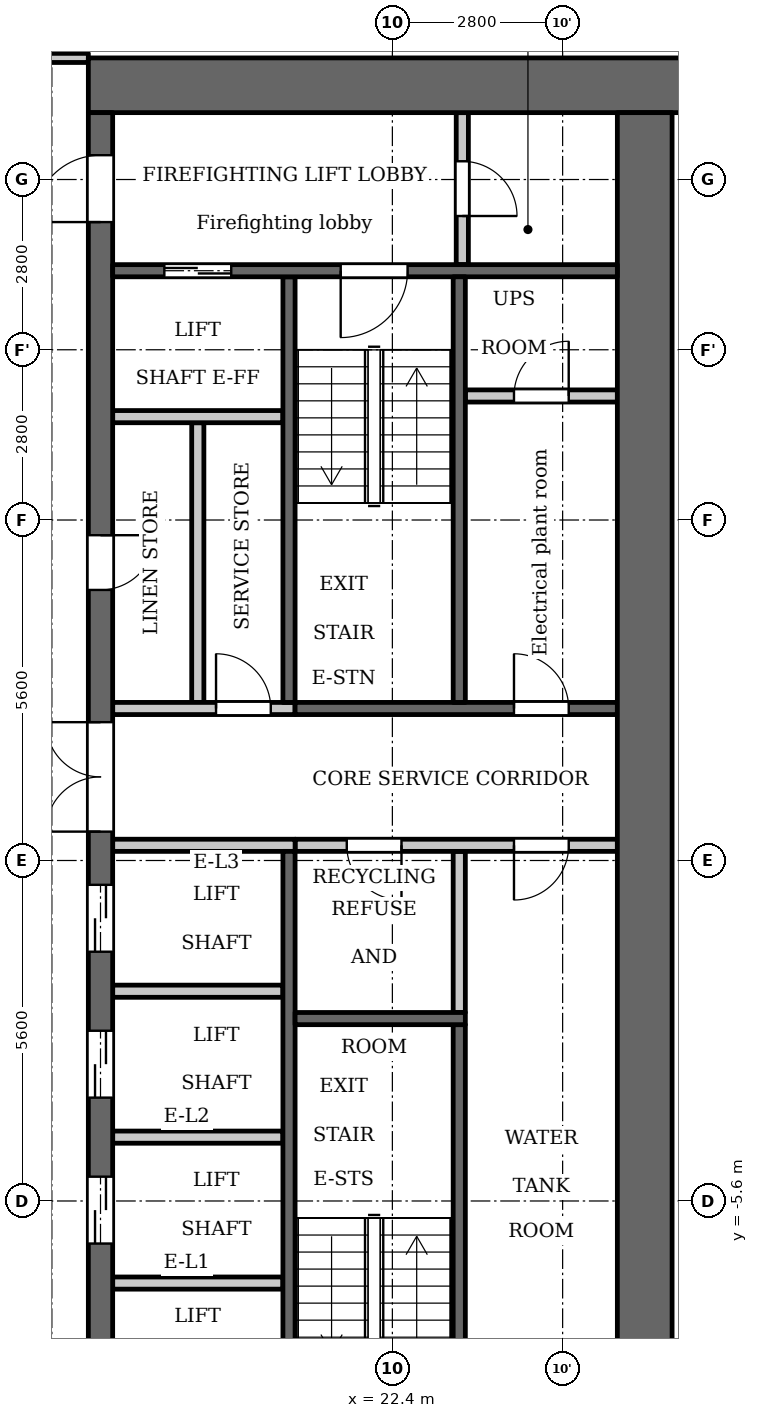
"""IFC4 building model, lengths in metres.
Left out: names, types, materials, properties, quantities, classifications, styles, units other than length and angle.
Written with IfcOpenShell. Run it as: python <this file> out.ifc"""

import sys

from ifc_helpers import new_model, si_unit, direction, frame, frame_2d, origin, place, context, subcontext, project, spatial, rectangle, extrude, element, fill, save


model = new_model("IFC4")
c1 = context("Model", 3, precision=1e-05, world=origin(), true_north=direction((0.0, 1.0)))
c2 = subcontext(c1, "Body", "Model", "MODEL_VIEW")
j1 = project(units=[si_unit("LENGTHUNIT", "METRE"), si_unit("PLANEANGLEUNIT", "RADIAN")], contexts=[c1])
p1 = place(None, origin())
s1 = spatial("IfcSite", under=j1, at=p1, CompositionType="ELEMENT")
p2 = place(p1, origin())
s2 = spatial("IfcBuilding", under=s1, at=p2, CompositionType="ELEMENT")
p3 = place(p2, frame((0.0, 0.0, 69.0)))
s3 = spatial("IfcBuildingStorey", under=s2, at=p3, CompositionType="ELEMENT", Elevation=69.0)
p4 = place(p3, frame((23.5, -2.5, 0.0), z_axis=(0.0, 0.0, 1.0), x_axis=(0.0, 1.0, 0.0)))
e1 = element("IfcWall", 1, at=p4, inside=s3, PredefinedType="PARTITIONING", context=c2, shape_type="SweptSolid", body=[
    extrude(rectangle(XDim=2.65, YDim=0.2, at=frame_2d((1.325, 0.0))), origin(), (0.0, 0.0, 1.0), 3.15),
])
p5 = place(p3, frame((20.7, 2.6, 0.0), z_axis=(0.0, 0.0, 1.0), x_axis=(0.0, 1.0, 0.0)))
e2 = element("IfcWall", 2, at=p5, inside=s3, PredefinedType="SHEAR", context=c2, shape_type="SweptSolid", body=[
    extrude(rectangle(XDim=7.0, YDim=0.2, at=frame_2d((3.5, 0.0))), origin(), (0.0, 0.0, 1.0), 3.15),
])
p6 = place(p3, frame((20.7, -9.6, 0.0), z_axis=(0.0, 0.0, 1.0), x_axis=(0.0, 1.0, 0.0)))
e3 = element("IfcWall", 3, at=p6, inside=s3, PredefinedType="SHEAR", context=c2, shape_type="SweptSolid", body=[
    extrude(rectangle(XDim=9.75, YDim=0.2, at=frame_2d((4.875, 0.0))), origin(), (0.0, 0.0, 1.0), 3.15),
])
p7 = place(p3, frame((20.8, 2.5, 0.0), z_axis=(0.0, 0.0, 1.0), x_axis=(1.0, 0.0, 0.0)))
e4 = element("IfcWall", 4, at=p7, inside=s3, PredefinedType="SHEAR", context=c2, shape_type="SweptSolid", body=[
    extrude(rectangle(XDim=5.3, YDim=0.2, at=frame_2d((2.65, 0.0))), origin(), (0.0, 0.0, 1.0), 3.15),
])
p8 = place(p7, frame((3.6, 0.0, 0.0)))
e5 = element("IfcOpeningElement", 5, at=p8, cuts=e4, PredefinedType="OPENING", context=c2, shape_type="SweptSolid", body=[
    extrude(rectangle(XDim=0.9, YDim=2.1, at=frame_2d((0.45, 1.05))), frame((0.0, 0.11, 0.0), z_axis=(0.0, -1.0, 0.0), x_axis=(1.0, 0.0, 0.0)), (0.0, 0.0, 1.0), 0.22),
])
p9 = place(p3, frame((20.8, 0.25, 0.0), z_axis=(0.0, 0.0, 1.0), x_axis=(1.0, 0.0, 0.0)))
e6 = element("IfcWall", 6, at=p9, inside=s3, PredefinedType="PARTITIONING", context=c2, shape_type="SweptSolid", body=[
    extrude(rectangle(XDim=5.3, YDim=0.2, at=frame_2d((2.65, 0.0))), origin(), (0.0, 0.0, 1.0), 3.15),
])
p10 = place(p9, frame((0.85, 0.0, 0.0)))
e7 = element("IfcOpeningElement", 7, at=p10, cuts=e6, PredefinedType="OPENING", context=c2, shape_type="SweptSolid", body=[
    extrude(rectangle(XDim=0.9, YDim=2.1, at=frame_2d((0.45, 1.05))), frame((0.0, 0.11, 0.0), z_axis=(0.0, -1.0, 0.0), x_axis=(1.0, 0.0, 0.0)), (0.0, 0.0, 1.0), 0.22),
])
p11 = place(p9, frame((3.6, 0.0, 0.0)))
e8 = element("IfcOpeningElement", 8, at=p11, cuts=e6, PredefinedType="OPENING", context=c2, shape_type="SweptSolid", body=[
    extrude(rectangle(XDim=0.9, YDim=2.1, at=frame_2d((0.45, 1.05))), frame((0.0, 0.11, 0.0), z_axis=(0.0, -1.0, 0.0), x_axis=(1.0, 0.0, 0.0)), (0.0, 0.0, 1.0), 0.22),
])
p12 = place(p3, frame((17.4, 12.75, 0.0), z_axis=(0.0, 0.0, 1.0), x_axis=(1.0, 0.0, 0.0)))
e9 = element("IfcWall", 9, at=p12, inside=s3, PredefinedType="SHEAR", context=c2, shape_type="SweptSolid", body=[
    extrude(rectangle(XDim=10.4, YDim=0.9, at=frame_2d((5.2, 0.0))), origin(), (0.0, 0.0, 1.0), 3.15),
])
p13 = place(p3, frame((19.2, 2.6, 0.0), z_axis=(0.0, 0.0, 1.0), x_axis=(0.0, 1.0, 0.0)))
e10 = element("IfcWall", 10, at=p13, inside=s3, PredefinedType="PARTITIONING", context=c2, shape_type="SweptSolid", body=[
    extrude(rectangle(XDim=4.6, YDim=0.2, at=frame_2d((2.3, 0.0))), origin(), (0.0, 0.0, 1.0), 3.15),
])
p14 = place(p3, frame((17.6, -12.3, 0.0), z_axis=(0.0, 0.0, 1.0), x_axis=(0.0, 1.0, 0.0)))
e11 = element("IfcWall", 11, at=p14, inside=s3, PredefinedType="SHEAR", context=c2, shape_type="SweptSolid", body=[
    extrude(rectangle(XDim=24.6, YDim=0.4, at=frame_2d((12.3, 0.0))), origin(), (0.0, 0.0, 1.0), 3.15),
])
p15 = place(p14, frame((6.0, 0.0, 0.0)))
e12 = element("IfcOpeningElement", 12, at=p15, cuts=e11, PredefinedType="OPENING", context=c2, shape_type="SweptSolid", body=[
    extrude(rectangle(XDim=1.1, YDim=2.1, at=frame_2d((0.55, 1.05))), frame((0.0, 0.21, 0.0), z_axis=(0.0, -1.0, 0.0), x_axis=(1.0, 0.0, 0.0)), (0.0, 0.0, 1.0), 0.42),
])
p16 = place(p14, frame((8.4, 0.0, 0.0)))
e13 = element("IfcOpeningElement", 13, at=p16, cuts=e11, PredefinedType="OPENING", context=c2, shape_type="SweptSolid", body=[
    extrude(rectangle(XDim=1.1, YDim=2.1, at=frame_2d((0.55, 1.05))), frame((0.0, 0.21, 0.0), z_axis=(0.0, -1.0, 0.0), x_axis=(1.0, 0.0, 0.0)), (0.0, 0.0, 1.0), 0.42),
])
p17 = place(p14, frame((10.8, 0.0, 0.0)))
e14 = element("IfcOpeningElement", 14, at=p17, cuts=e11, PredefinedType="OPENING", context=c2, shape_type="SweptSolid", body=[
    extrude(rectangle(XDim=1.1, YDim=2.1, at=frame_2d((0.55, 1.05))), frame((0.0, 0.21, 0.0), z_axis=(0.0, -1.0, 0.0), x_axis=(1.0, 0.0, 0.0)), (0.0, 0.0, 1.0), 0.42),
])
p18 = place(p14, frame((16.75, 0.0, 0.0)))
e15 = element("IfcOpeningElement", 15, at=p18, cuts=e11, PredefinedType="OPENING", context=c2, shape_type="SweptSolid", body=[
    extrude(rectangle(XDim=0.9, YDim=2.1, at=frame_2d((0.45, 1.05))), frame((0.0, 0.21, 0.0), z_axis=(0.0, -1.0, 0.0), x_axis=(1.0, 0.0, 0.0)), (0.0, 0.0, 1.0), 0.42),
])
p19 = place(p14, frame((22.8, 0.0, 0.0)))
e16 = element("IfcOpeningElement", 16, at=p19, cuts=e11, PredefinedType="OPENING", context=c2, shape_type="SweptSolid", body=[
    extrude(rectangle(XDim=1.1, YDim=2.1, at=frame_2d((0.55, 1.05))), frame((0.0, 0.21, 0.0), z_axis=(0.0, -1.0, 0.0), x_axis=(1.0, 0.0, 0.0)), (0.0, 0.0, 1.0), 0.42),
])
p20 = place(p14, frame((0.7, 0.0, 0.0)))
e17 = element("IfcOpeningElement", 17, at=p20, cuts=e11, PredefinedType="OPENING", context=c2, shape_type="SweptSolid", body=[
    extrude(rectangle(XDim=1.1, YDim=2.1, at=frame_2d((0.55, 1.05))), frame((0.0, 0.21, 0.0), z_axis=(0.0, -1.0, 0.0), x_axis=(1.0, 0.0, 0.0)), (0.0, 0.0, 1.0), 0.42),
])
p21 = place(p14, frame((12.775, 0.0, 0.0)))
e18 = element("IfcOpeningElement", 18, at=p21, cuts=e11, PredefinedType="OPENING", context=c2, shape_type="SweptSolid", body=[
    extrude(rectangle(XDim=1.8, YDim=2.1, at=frame_2d((0.9, 1.05))), frame((0.0, 0.21, 0.0), z_axis=(0.0, -1.0, 0.0), x_axis=(1.0, 0.0, 0.0)), (0.0, 0.0, 1.0), 0.42),
])
p22 = place(p3, frame((26.55, -12.3, 0.0), z_axis=(0.0, 0.0, 1.0), x_axis=(0.0, 1.0, 0.0)))
e19 = element("IfcWall", 19, at=p22, inside=s3, PredefinedType="SHEAR", context=c2, shape_type="SweptSolid", body=[
    extrude(rectangle(XDim=24.6, YDim=0.9, at=frame_2d((12.3, 0.0))), origin(), (0.0, 0.0, 1.0), 3.15),
])
p23 = place(p3, frame((23.55, 9.8, 0.0), z_axis=(0.0, 0.0, 1.0), x_axis=(0.0, 1.0, 0.0)))
e20 = element("IfcWall", 20, at=p23, inside=s3, PredefinedType="PARTITIONING", context=c2, shape_type="SweptSolid", body=[
    extrude(rectangle(XDim=2.5, YDim=0.2, at=frame_2d((1.25, 0.0))), origin(), (0.0, 0.0, 1.0), 3.15),
])
p24 = place(p23, frame((0.8, 0.0, 0.0)))
e21 = element("IfcOpeningElement", 21, at=p24, cuts=e20, PredefinedType="OPENING", context=c2, shape_type="SweptSolid", body=[
    extrude(rectangle(XDim=0.9, YDim=2.1, at=frame_2d((0.45, 1.05))), frame((0.0, 0.11, 0.0), z_axis=(0.0, -1.0, 0.0), x_axis=(1.0, 0.0, 0.0)), (0.0, 0.0, 1.0), 0.22),
])
p25 = place(p3, frame((23.6, 7.64, 0.0), z_axis=(0.0, 0.0, 1.0), x_axis=(1.0, 0.0, 0.0)))
e22 = element("IfcWall", 22, at=p25, inside=s3, PredefinedType="PARTITIONING", context=c2, shape_type="SweptSolid", body=[
    extrude(rectangle(XDim=2.5, YDim=0.2, at=frame_2d((1.25, 0.0))), origin(), (0.0, 0.0, 1.0), 3.15),
])
p26 = place(p25, frame((0.8, 0.0, 0.0)))
e23 = element("IfcOpeningElement", 23, at=p26, cuts=e22, PredefinedType="OPENING", context=c2, shape_type="SweptSolid", body=[
    extrude(rectangle(XDim=0.9, YDim=2.1, at=frame_2d((0.45, 1.05))), frame((0.0, 0.11, 0.0), z_axis=(0.0, -1.0, 0.0), x_axis=(1.0, 0.0, 0.0)), (0.0, 0.0, 1.0), 0.22),
])
for number, where, z_axis, x_axis in (
    (24, (17.8, -6.95, 0.0), (0.0, 0.0, 1.0), (1.0, 0.0, 0.0)),
    (25, (17.8, -4.55, 0.0), (0.0, 0.0, 1.0), (1.0, 0.0, 0.0)),
    (26, (17.8, -2.15, 0.0), (0.0, 0.0, 1.0), (1.0, 0.0, 0.0)),
):
    element("IfcWall", number, at=place(p3, frame(where, z_axis=z_axis, x_axis=x_axis)), inside=s3, PredefinedType="PARTITIONING", context=c2, shape_type="SweptSolid", body=[
        extrude(rectangle(XDim=2.8, YDim=0.2, at=frame_2d((1.4, 0.0))), origin(), (0.0, 0.0, 1.0), 3.15),
    ])
p27 = place(p3, frame((17.8, 0.25, 0.0), z_axis=(0.0, 0.0, 1.0), x_axis=(1.0, 0.0, 0.0)))
e27 = element("IfcWall", 27, at=p27, inside=s3, PredefinedType="PARTITIONING", context=c2, shape_type="SweptSolid", body=[
    extrude(rectangle(XDim=3.0, YDim=0.2, at=frame_2d((1.5, 0.0))), origin(), (0.0, 0.0, 1.0), 3.15),
])
p28 = place(p3, frame((17.8, 2.5, 0.0), z_axis=(0.0, 0.0, 1.0), x_axis=(1.0, 0.0, 0.0)))
e28 = element("IfcWall", 28, at=p28, inside=s3, PredefinedType="PARTITIONING", context=c2, shape_type="SweptSolid", body=[
    extrude(rectangle(XDim=3.0, YDim=0.2, at=frame_2d((1.5, 0.0))), origin(), (0.0, 0.0, 1.0), 3.15),
])
p29 = place(p28, frame((1.7, 0.0, 0.0)))
e29 = element("IfcOpeningElement", 29, at=p29, cuts=e28, PredefinedType="OPENING", context=c2, shape_type="SweptSolid", body=[
    extrude(rectangle(XDim=0.9, YDim=2.1, at=frame_2d((0.45, 1.05))), frame((0.0, 0.11, 0.0), z_axis=(0.0, -1.0, 0.0), x_axis=(1.0, 0.0, 0.0)), (0.0, 0.0, 1.0), 0.22),
])
p30 = place(p3, frame((17.8, 7.3, 0.0), z_axis=(0.0, 0.0, 1.0), x_axis=(1.0, 0.0, 0.0)))
e30 = element("IfcWall", 30, at=p30, inside=s3, PredefinedType="PARTITIONING", context=c2, shape_type="SweptSolid", body=[
    extrude(rectangle(XDim=2.8, YDim=0.2, at=frame_2d((1.4, 0.0))), origin(), (0.0, 0.0, 1.0), 3.15),
])
p31 = place(p3, frame((17.8, 9.7, 0.0), z_axis=(0.0, 0.0, 1.0), x_axis=(1.0, 0.0, 0.0)))
e31 = element("IfcWall", 31, at=p31, inside=s3, PredefinedType="SHEAR", context=c2, shape_type="SweptSolid", body=[
    extrude(rectangle(XDim=8.3, YDim=0.2, at=frame_2d((4.15, 0.0))), origin(), (0.0, 0.0, 1.0), 3.15),
])
p32 = place(p31, frame((0.85, 0.0, 0.0)))
e32 = element("IfcOpeningElement", 32, at=p32, cuts=e31, PredefinedType="OPENING", context=c2, shape_type="SweptSolid", body=[
    extrude(rectangle(XDim=1.1, YDim=2.1, at=frame_2d((0.55, 1.05))), frame((0.0, 0.11, 0.0), z_axis=(0.0, -1.0, 0.0), x_axis=(1.0, 0.0, 0.0)), (0.0, 0.0, 1.0), 0.22),
])
p33 = place(p31, frame((3.75, 0.0, 0.0)))
e33 = element("IfcOpeningElement", 33, at=p33, cuts=e31, PredefinedType="OPENING", context=c2, shape_type="SweptSolid", body=[
    extrude(rectangle(XDim=1.1, YDim=2.1, at=frame_2d((0.55, 1.05))), frame((0.0, 0.11, 0.0), z_axis=(0.0, -1.0, 0.0), x_axis=(1.0, 0.0, 0.0)), (0.0, 0.0, 1.0), 0.22),
])
p34 = place(p3, frame((23.5, 2.6, 0.0), z_axis=(0.0, 0.0, 1.0), x_axis=(0.0, 1.0, 0.0)))
e34 = element("IfcWall", 34, at=p34, inside=s3, PredefinedType="SHEAR", context=c2, shape_type="SweptSolid", body=[
    extrude(rectangle(XDim=7.0, YDim=0.2, at=frame_2d((3.5, 0.0))), origin(), (0.0, 0.0, 1.0), 3.15),
])
p35 = place(p3, frame((23.5, -9.6, 0.0), z_axis=(0.0, 0.0, 1.0), x_axis=(0.0, 1.0, 0.0)))
e35 = element("IfcWall", 35, at=p35, inside=s3, PredefinedType="SHEAR", context=c2, shape_type="SweptSolid", body=[
    extrude(rectangle(XDim=6.9, YDim=0.2, at=frame_2d((3.45, 0.0))), origin(), (0.0, 0.0, 1.0), 3.15),
])
p36 = place(p3, frame((20.8, -2.6, 0.0), z_axis=(0.0, 0.0, 1.0), x_axis=(1.0, 0.0, 0.0)))
e36 = element("IfcWall", 36, at=p36, inside=s3, PredefinedType="SHEAR", context=c2, shape_type="SweptSolid", body=[
    extrude(rectangle(XDim=2.8, YDim=0.2, at=frame_2d((1.4, 0.0))), origin(), (0.0, 0.0, 1.0), 3.15),
])
p37 = place(p3, frame((-17.4, 13.2, 0.0), z_axis=(0.0, 0.0, 1.0), x_axis=(1.0, 0.0, 0.0)))
e37 = element("IfcWall", 37, at=p37, inside=s3, PredefinedType="PARTITIONING", context=c2, shape_type="SweptSolid", body=[
    extrude(rectangle(XDim=34.8, YDim=0.15, at=frame_2d((17.4, 0.0))), origin(), (0.0, 0.0, 1.0), 3.15),
])
p38 = place(p37, frame((0.75, 0.0, 0.0)))
e38 = element("IfcOpeningElement", 38, at=p38, cuts=e37, PredefinedType="OPENING", context=c2, shape_type="SweptSolid", body=[
    extrude(rectangle(XDim=1.0, YDim=2.1, at=frame_2d((0.5, 1.05))), frame((0.0, 0.085, 0.0), z_axis=(0.0, -1.0, 0.0), x_axis=(1.0, 0.0, 0.0)), (0.0, 0.0, 1.0), 0.17),
])
p39 = place(p37, frame((33.15, 0.0, 0.0)))
e39 = element("IfcOpeningElement", 39, at=p39, cuts=e37, PredefinedType="OPENING", context=c2, shape_type="SweptSolid", body=[
    extrude(rectangle(XDim=1.0, YDim=2.1, at=frame_2d((0.5, 1.05))), frame((0.0, 0.085, 0.0), z_axis=(0.0, -1.0, 0.0), x_axis=(1.0, 0.0, 0.0)), (0.0, 0.0, 1.0), 0.17),
])
p40 = place(p37, frame((6.85, 0.0, 0.0)))
e40 = element("IfcOpeningElement", 40, at=p40, cuts=e37, PredefinedType="OPENING", context=c2, shape_type="SweptSolid", body=[
    extrude(rectangle(XDim=1.0, YDim=2.1, at=frame_2d((0.5, 1.05))), frame((0.0, 0.085, 0.0), z_axis=(0.0, -1.0, 0.0), x_axis=(1.0, 0.0, 0.0)), (0.0, 0.0, 1.0), 0.17),
])
p41 = place(p37, frame((12.45, 0.0, 0.0)))
e41 = element("IfcOpeningElement", 41, at=p41, cuts=e37, PredefinedType="OPENING", context=c2, shape_type="SweptSolid", body=[
    extrude(rectangle(XDim=1.0, YDim=2.1, at=frame_2d((0.5, 1.05))), frame((0.0, 0.085, 0.0), z_axis=(0.0, -1.0, 0.0), x_axis=(1.0, 0.0, 0.0)), (0.0, 0.0, 1.0), 0.17),
])
p42 = place(p37, frame((23.65, 0.0, 0.0)))
e42 = element("IfcOpeningElement", 42, at=p42, cuts=e37, PredefinedType="OPENING", context=c2, shape_type="SweptSolid", body=[
    extrude(rectangle(XDim=1.0, YDim=2.1, at=frame_2d((0.5, 1.05))), frame((0.0, 0.085, 0.0), z_axis=(0.0, -1.0, 0.0), x_axis=(1.0, 0.0, 0.0)), (0.0, 0.0, 1.0), 0.17),
])
p43 = place(p15, origin())
e43 = element("IfcDoor", 43, at=p43, inside=s3, OperationType="DOUBLE_DOOR_SLIDING", PredefinedType="DOOR", context=c2, shape_type="SweptSolid", body=[
    extrude(rectangle(XDim=1.1, YDim=2.1, at=frame_2d((0.55, 1.05))), frame((0.0, 0.025, 0.0), z_axis=(0.0, -1.0, 0.0), x_axis=(1.0, 0.0, 0.0)), (0.0, 0.0, 1.0), 0.05),
])
fill(e12, e43)
p44 = place(p16, origin())
e44 = element("IfcDoor", 44, at=p44, inside=s3, OperationType="DOUBLE_DOOR_SLIDING", PredefinedType="DOOR", context=c2, shape_type="SweptSolid", body=[
    extrude(rectangle(XDim=1.1, YDim=2.1, at=frame_2d((0.55, 1.05))), frame((0.0, 0.025, 0.0), z_axis=(0.0, -1.0, 0.0), x_axis=(1.0, 0.0, 0.0)), (0.0, 0.0, 1.0), 0.05),
])
fill(e13, e44)
p45 = place(p17, origin())
e45 = element("IfcDoor", 45, at=p45, inside=s3, OperationType="DOUBLE_DOOR_SLIDING", PredefinedType="DOOR", context=c2, shape_type="SweptSolid", body=[
    extrude(rectangle(XDim=1.1, YDim=2.1, at=frame_2d((0.55, 1.05))), frame((0.0, 0.025, 0.0), z_axis=(0.0, -1.0, 0.0), x_axis=(1.0, 0.0, 0.0)), (0.0, 0.0, 1.0), 0.05),
])
fill(e14, e45)
p46 = place(p18, origin())
e46 = element("IfcDoor", 46, at=p46, inside=s3, OperationType="SINGLE_SWING_RIGHT", PredefinedType="DOOR", context=c2, shape_type="SweptSolid", body=[
    extrude(rectangle(XDim=0.9, YDim=2.1, at=frame_2d((0.45, 1.05))), frame((0.0, 0.025, 0.0), z_axis=(0.0, -1.0, 0.0), x_axis=(1.0, 0.0, 0.0)), (0.0, 0.0, 1.0), 0.05),
])
fill(e15, e46)
p47 = place(p29, origin())
e47 = element("IfcDoor", 47, at=p47, inside=s3, OperationType="SINGLE_SWING_RIGHT", PredefinedType="DOOR", context=c2, shape_type="SweptSolid", body=[
    extrude(rectangle(XDim=0.9, YDim=2.1, at=frame_2d((0.45, 1.05))), frame((0.0, 0.025, 0.0), z_axis=(0.0, -1.0, 0.0), x_axis=(1.0, 0.0, 0.0)), (0.0, 0.0, 1.0), 0.05),
])
fill(e29, e47)
p48 = place(p32, origin())
e48 = element("IfcDoor", 48, at=p48, inside=s3, OperationType="DOUBLE_DOOR_SLIDING", PredefinedType="DOOR", context=c2, shape_type="SweptSolid", body=[
    extrude(rectangle(XDim=1.1, YDim=2.1, at=frame_2d((0.55, 1.05))), frame((0.0, 0.025, 0.0), z_axis=(0.0, -1.0, 0.0), x_axis=(1.0, 0.0, 0.0)), (0.0, 0.0, 1.0), 0.05),
])
fill(e32, e48)
p49 = place(p19, origin())
e49 = element("IfcDoor", 49, at=p49, inside=s3, OperationType="SINGLE_SWING_RIGHT", PredefinedType="DOOR", context=c2, shape_type="SweptSolid", body=[
    extrude(rectangle(XDim=1.1, YDim=2.1, at=frame_2d((0.55, 1.05))), frame((0.0, 0.025, 0.0), z_axis=(0.0, -1.0, 0.0), x_axis=(1.0, 0.0, 0.0)), (0.0, 0.0, 1.0), 0.05),
])
fill(e16, e49)
p50 = place(p24, origin())
e50 = element("IfcDoor", 50, at=p50, inside=s3, OperationType="SINGLE_SWING_LEFT", PredefinedType="DOOR", context=c2, shape_type="SweptSolid", body=[
    extrude(rectangle(XDim=0.9, YDim=2.1, at=frame_2d((0.45, 1.05))), frame((0.0, 0.025, 0.0), z_axis=(0.0, -1.0, 0.0), x_axis=(1.0, 0.0, 0.0)), (0.0, 0.0, 1.0), 0.05),
])
fill(e21, e50)
p51 = place(p33, origin())
e51 = element("IfcDoor", 51, at=p51, inside=s3, OperationType="SINGLE_SWING_LEFT", PredefinedType="DOOR", context=c2, shape_type="SweptSolid", body=[
    extrude(rectangle(XDim=1.1, YDim=2.1, at=frame_2d((0.55, 1.05))), frame((0.0, 0.025, 0.0), z_axis=(0.0, -1.0, 0.0), x_axis=(1.0, 0.0, 0.0)), (0.0, 0.0, 1.0), 0.05),
])
fill(e33, e51)
p52 = place(p21, origin())
e52 = element("IfcDoor", 52, at=p52, inside=s3, OperationType="DOUBLE_DOOR_SINGLE_SWING", PredefinedType="DOOR", context=c2, shape_type="SweptSolid", body=[
    extrude(rectangle(XDim=1.8, YDim=2.1, at=frame_2d((0.9, 1.05))), frame((0.0, 0.025, 0.0), z_axis=(0.0, -1.0, 0.0), x_axis=(1.0, 0.0, 0.0)), (0.0, 0.0, 1.0), 0.05),
])
fill(e18, e52)
p53 = place(p10, origin())
e53 = element("IfcDoor", 53, at=p53, inside=s3, OperationType="SINGLE_SWING_RIGHT", PredefinedType="DOOR", context=c2, shape_type="SweptSolid", body=[
    extrude(rectangle(XDim=0.9, YDim=2.1, at=frame_2d((0.45, 1.05))), frame((0.0, 0.025, 0.0), z_axis=(0.0, -1.0, 0.0), x_axis=(1.0, 0.0, 0.0)), (0.0, 0.0, 1.0), 0.05),
])
fill(e7, e53)
p54 = place(p11, origin())
e54 = element("IfcDoor", 54, at=p54, inside=s3, OperationType="SINGLE_SWING_LEFT", PredefinedType="DOOR", context=c2, shape_type="SweptSolid", body=[
    extrude(rectangle(XDim=0.9, YDim=2.1, at=frame_2d((0.45, 1.05))), frame((0.0, 0.025, 0.0), z_axis=(0.0, -1.0, 0.0), x_axis=(1.0, 0.0, 0.0)), (0.0, 0.0, 1.0), 0.05),
])
fill(e8, e54)
p55 = place(p26, origin())
e55 = element("IfcDoor", 55, at=p55, inside=s3, OperationType="SINGLE_SWING_LEFT", PredefinedType="DOOR", context=c2, shape_type="SweptSolid", body=[
    extrude(rectangle(XDim=0.9, YDim=2.1, at=frame_2d((0.45, 1.05))), frame((0.0, 0.025, 0.0), z_axis=(0.0, -1.0, 0.0), x_axis=(1.0, 0.0, 0.0)), (0.0, 0.0, 1.0), 0.05),
])
fill(e23, e55)
p56 = place(p8, origin())
e56 = element("IfcDoor", 56, at=p56, inside=s3, OperationType="SINGLE_SWING_RIGHT", PredefinedType="DOOR", context=c2, shape_type="SweptSolid", body=[
    extrude(rectangle(XDim=0.9, YDim=2.1, at=frame_2d((0.45, 1.05))), frame((0.0, 0.025, 0.0), z_axis=(0.0, -1.0, 0.0), x_axis=(1.0, 0.0, 0.0)), (0.0, 0.0, 1.0), 0.05),
])
fill(e5, e56)
save(model, sys.argv[1])
